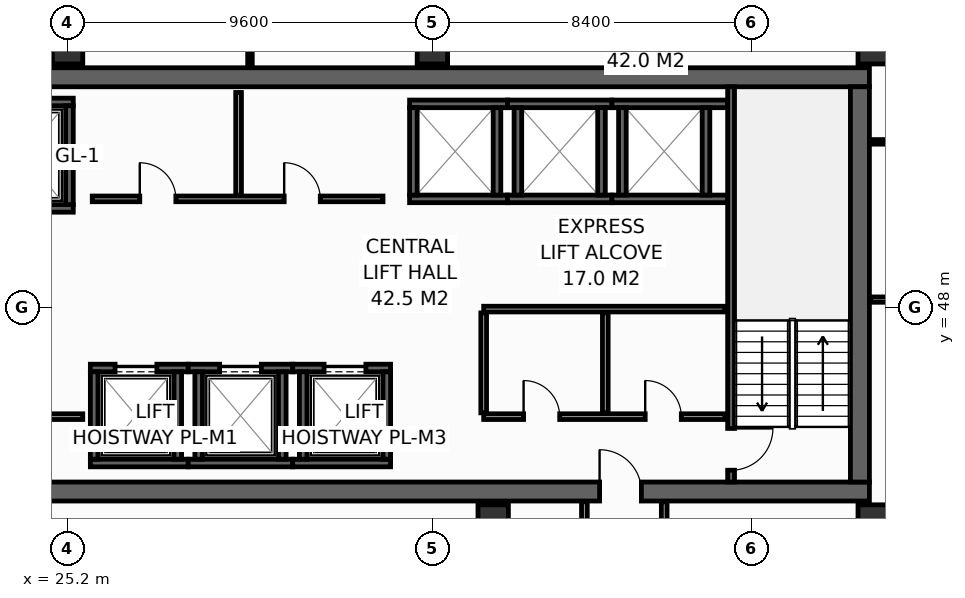
"""IFC4 building model, lengths in metres.
Left out: names, types, materials, properties, quantities, classifications, styles, units other than length and angle.
Written with IfcOpenShell. Run it as: python <this file> out.ifc"""

import sys

from ifc_helpers import new_model, si_unit, direction, frame, frame_2d, origin, origin_2d, place, context, subcontext, project, spatial, rectangle, hollow_rectangle, extrude, element, fill, save


model = new_model("IFC4")
c1 = context("Model", 3, precision=1e-05, world=origin(), true_north=direction((0.0, 1.0)))
c2 = subcontext(c1, "Body", "Model", "MODEL_VIEW")
j1 = project(units=[si_unit("LENGTHUNIT", "METRE"), si_unit("PLANEANGLEUNIT", "RADIAN")], contexts=[c1])
p1 = place(None, origin())
s1 = spatial("IfcSite", under=j1, at=p1, CompositionType="ELEMENT")
p2 = place(p1, origin())
s2 = spatial("IfcBuilding", under=s1, at=p2, CompositionType="ELEMENT")
p3 = place(p2, frame((0.0, 0.0, 194.2)))
s3 = spatial("IfcBuildingStorey", under=s2, at=p3, CompositionType="ELEMENT", Elevation=194.2)
p4 = place(p3, frame((13.6, 43.15, 0.0), z_axis=(0.0, 0.0, 1.0), x_axis=(1.0, 0.0, 0.0)))
e1 = element("IfcWall", 1, at=p4, inside=s3, PredefinedType="SHEAR", context=c2, shape_type="SweptSolid", body=[
    extrude(rectangle(XDim=32.7, YDim=0.5, at=frame_2d((16.35, 0.0))), origin(), (0.0, 0.0, 1.0), 3.55),
])
p5 = place(p4, frame((5.4, 0.0, 0.0)))
e2 = element("IfcOpeningElement", 2, at=p5, cuts=e1, PredefinedType="OPENING", context=c2, shape_type="SweptSolid", body=[
    extrude(rectangle(XDim=1.1, YDim=2.15, at=frame_2d((0.55, 1.075))), frame((0.0, 0.26, 0.0), z_axis=(0.0, -1.0, 0.0), x_axis=(1.0, 0.0, 0.0)), (0.0, 0.0, 1.0), 0.52),
])
p6 = place(p4, frame((25.6, 0.0, 0.0)))
e3 = element("IfcOpeningElement", 3, at=p6, cuts=e1, PredefinedType="OPENING", context=c2, shape_type="SweptSolid", body=[
    extrude(rectangle(XDim=1.1, YDim=2.15, at=frame_2d((0.55, 1.075))), frame((0.0, 0.26, 0.0), z_axis=(0.0, -1.0, 0.0), x_axis=(1.0, 0.0, 0.0)), (0.0, 0.0, 1.0), 0.52),
])
p7 = place(p3, frame((13.6, 54.05, 0.0), z_axis=(0.0, 0.0, 1.0), x_axis=(1.0, 0.0, 0.0)))
e4 = element("IfcWall", 4, at=p7, inside=s3, PredefinedType="SHEAR", context=c2, shape_type="SweptSolid", body=[
    extrude(rectangle(XDim=32.7, YDim=0.5, at=frame_2d((16.35, 0.0))), origin(), (0.0, 0.0, 1.0), 3.55),
])
p8 = place(p3, frame((46.05, 43.4, 0.0), z_axis=(0.0, 0.0, 1.0), x_axis=(0.0, 1.0, 0.0)))
e5 = element("IfcWall", 5, at=p8, inside=s3, PredefinedType="SHEAR", context=c2, shape_type="SweptSolid", body=[
    extrude(rectangle(XDim=10.4, YDim=0.5, at=frame_2d((5.2, 0.0))), origin(), (0.0, 0.0, 1.0), 3.55),
])
for number, where, z_axis, x_axis in (
    (6, (25.2, 54.8, 0.0), (0.0, 0.0, 1.0), (1.0, 0.0, 0.0)),
    (7, (34.8, 54.8, 0.0), (0.0, 0.0, 1.0), (1.0, 0.0, 0.0)),
    (8, (46.4, 54.8, 0.0), (0.0, 0.0, 1.0), (1.0, 0.0, 0.0)),
    (9, (36.4, 42.4, 0.0), (0.0, 0.0, 1.0), (1.0, 0.0, 0.0)),
    (10, (46.4, 42.4, 0.0), (0.0, 0.0, 1.0), (1.0, 0.0, 0.0)),
):
    element("IfcColumn", number, at=place(p3, frame(where, z_axis=z_axis, x_axis=x_axis)), inside=s3, PredefinedType="COLUMN", context=c2, shape_type="SweptSolid", body=[
        extrude(hollow_rectangle(XDim=0.8, YDim=0.8, WallThickness=0.036, at=origin_2d()), origin(), (0.0, 0.0, 1.0), 3.8),
    ])
p9 = place(p3, frame((22.5, 50.6, 0.0), z_axis=(0.0, 0.0, 1.0), x_axis=(1.0, 0.0, 0.0)))
e11 = element("IfcWall", 11, at=p9, inside=s3, PredefinedType="SHEAR", context=c2, shape_type="SweptSolid", body=[
    extrude(rectangle(XDim=2.85, YDim=0.2, at=frame_2d((1.425, 0.0))), origin(), (0.0, 0.0, 1.0), 3.55),
])
p10 = place(p9, frame((0.925, 0.0, 0.0)))
e12 = element("IfcOpeningElement", 12, at=p10, cuts=e11, PredefinedType="OPENING", context=c2, shape_type="SweptSolid", body=[
    extrude(rectangle(XDim=1.25, YDim=2.3, at=frame_2d((0.625, 1.15))), frame((0.0, 0.11, 0.0), z_axis=(0.0, -1.0, 0.0), x_axis=(1.0, 0.0, 0.0)), (0.0, 0.0, 1.0), 0.22),
])
p11 = place(p3, frame((22.5, 53.4, 0.0), z_axis=(0.0, 0.0, 1.0), x_axis=(1.0, 0.0, 0.0)))
e13 = element("IfcWall", 13, at=p11, inside=s3, PredefinedType="SHEAR", context=c2, shape_type="SweptSolid", body=[
    extrude(rectangle(XDim=2.85, YDim=0.2, at=frame_2d((1.425, 0.0))), origin(), (0.0, 0.0, 1.0), 3.55),
])
p12 = place(p3, frame((25.25, 50.7, 0.0), z_axis=(0.0, 0.0, 1.0), x_axis=(0.0, 1.0, 0.0)))
e14 = element("IfcWall", 14, at=p12, inside=s3, PredefinedType="SHEAR", context=c2, shape_type="SweptSolid", body=[
    extrude(rectangle(XDim=2.6, YDim=0.2, at=frame_2d((1.3, 0.0))), origin(), (0.0, 0.0, 1.0), 3.55),
])
p13 = place(p3, frame((25.8, 43.9, 0.0), z_axis=(0.0, 0.0, 1.0), x_axis=(1.0, 0.0, 0.0)))
e15 = element("IfcWall", 15, at=p13, inside=s3, PredefinedType="SHEAR", context=c2, shape_type="SweptSolid", body=[
    extrude(rectangle(XDim=2.575, YDim=0.2, at=frame_2d((1.288, 0.0))), origin(), (0.0, 0.0, 1.0), 3.55),
])
p14 = place(p3, frame((25.8, 46.4, 0.0), z_axis=(0.0, 0.0, 1.0), x_axis=(1.0, 0.0, 0.0)))
e16 = element("IfcWall", 16, at=p14, inside=s3, PredefinedType="SHEAR", context=c2, shape_type="SweptSolid", body=[
    extrude(rectangle(XDim=2.575, YDim=0.2, at=frame_2d((1.288, 0.0))), origin(), (0.0, 0.0, 1.0), 3.55),
])
p15 = place(p14, frame((0.65, 0.0, 0.0)))
e17 = element("IfcOpeningElement", 17, at=p15, cuts=e16, PredefinedType="OPENING", context=c2, shape_type="SweptSolid", body=[
    extrude(rectangle(XDim=1.1, YDim=2.2, at=frame_2d((0.55, 1.1))), frame((0.0, 0.11, 0.0), z_axis=(0.0, -1.0, 0.0), x_axis=(1.0, 0.0, 0.0)), (0.0, 0.0, 1.0), 0.22),
])
for number, where, z_axis, x_axis in (
    (18, (25.9, 44.0, 0.0), (0.0, 0.0, 1.0), (0.0, 1.0, 0.0)),
    (19, (28.1, 44.0, 0.0), (0.0, 0.0, 1.0), (0.0, 1.0, 0.0)),
):
    element("IfcWall", number, at=place(p3, frame(where, z_axis=z_axis, x_axis=x_axis)), inside=s3, PredefinedType="SHEAR", context=c2, shape_type="SweptSolid", body=[
        extrude(rectangle(XDim=2.3, YDim=0.2, at=frame_2d((1.15, 0.0))), origin(), (0.0, 0.0, 1.0), 3.55),
    ])
p16 = place(p3, frame((28.375, 43.9, 0.0), z_axis=(0.0, 0.0, 1.0), x_axis=(1.0, 0.0, 0.0)))
e20 = element("IfcWall", 20, at=p16, inside=s3, PredefinedType="SHEAR", context=c2, shape_type="SweptSolid", body=[
    extrude(rectangle(XDim=2.75, YDim=0.2, at=frame_2d((1.375, 0.0))), origin(), (0.0, 0.0, 1.0), 3.55),
])
p17 = place(p3, frame((28.375, 46.4, 0.0), z_axis=(0.0, 0.0, 1.0), x_axis=(1.0, 0.0, 0.0)))
e21 = element("IfcWall", 21, at=p17, inside=s3, PredefinedType="SHEAR", context=c2, shape_type="SweptSolid", body=[
    extrude(rectangle(XDim=2.75, YDim=0.2, at=frame_2d((1.375, 0.0))), origin(), (0.0, 0.0, 1.0), 3.55),
])
p18 = place(p17, frame((0.825, 0.0, 0.0)))
e22 = element("IfcOpeningElement", 22, at=p18, cuts=e21, PredefinedType="OPENING", context=c2, shape_type="SweptSolid", body=[
    extrude(rectangle(XDim=1.1, YDim=2.2, at=frame_2d((0.55, 1.1))), frame((0.0, 0.11, 0.0), z_axis=(0.0, -1.0, 0.0), x_axis=(1.0, 0.0, 0.0)), (0.0, 0.0, 1.0), 0.22),
])
for number, where, z_axis, x_axis in (
    (23, (28.65, 44.0, 0.0), (0.0, 0.0, 1.0), (0.0, 1.0, 0.0)),
    (24, (30.85, 44.0, 0.0), (0.0, 0.0, 1.0), (0.0, 1.0, 0.0)),
):
    element("IfcWall", number, at=place(p3, frame(where, z_axis=z_axis, x_axis=x_axis)), inside=s3, PredefinedType="SHEAR", context=c2, shape_type="SweptSolid", body=[
        extrude(rectangle(XDim=2.3, YDim=0.2, at=frame_2d((1.15, 0.0))), origin(), (0.0, 0.0, 1.0), 3.55),
    ])
p19 = place(p3, frame((31.125, 43.9, 0.0), z_axis=(0.0, 0.0, 1.0), x_axis=(1.0, 0.0, 0.0)))
e25 = element("IfcWall", 25, at=p19, inside=s3, PredefinedType="SHEAR", context=c2, shape_type="SweptSolid", body=[
    extrude(rectangle(XDim=2.575, YDim=0.2, at=frame_2d((1.288, 0.0))), origin(), (0.0, 0.0, 1.0), 3.55),
])
p20 = place(p3, frame((31.125, 46.4, 0.0), z_axis=(0.0, 0.0, 1.0), x_axis=(1.0, 0.0, 0.0)))
e26 = element("IfcWall", 26, at=p20, inside=s3, PredefinedType="SHEAR", context=c2, shape_type="SweptSolid", body=[
    extrude(rectangle(XDim=2.575, YDim=0.2, at=frame_2d((1.288, 0.0))), origin(), (0.0, 0.0, 1.0), 3.55),
])
p21 = place(p20, frame((0.825, 0.0, 0.0)))
e27 = element("IfcOpeningElement", 27, at=p21, cuts=e26, PredefinedType="OPENING", context=c2, shape_type="SweptSolid", body=[
    extrude(rectangle(XDim=1.1, YDim=2.2, at=frame_2d((0.55, 1.1))), frame((0.0, 0.11, 0.0), z_axis=(0.0, -1.0, 0.0), x_axis=(1.0, 0.0, 0.0)), (0.0, 0.0, 1.0), 0.22),
])
for number, where, z_axis, x_axis in (
    (28, (31.4, 44.0, 0.0), (0.0, 0.0, 1.0), (0.0, 1.0, 0.0)),
    (29, (33.6, 44.0, 0.0), (0.0, 0.0, 1.0), (0.0, 1.0, 0.0)),
):
    element("IfcWall", number, at=place(p3, frame(where, z_axis=z_axis, x_axis=x_axis)), inside=s3, PredefinedType="SHEAR", context=c2, shape_type="SweptSolid", body=[
        extrude(rectangle(XDim=2.3, YDim=0.2, at=frame_2d((1.15, 0.0))), origin(), (0.0, 0.0, 1.0), 3.55),
    ])
for number, where, z_axis, x_axis in (
    (30, (34.2, 50.85, 0.0), (0.0, 0.0, 1.0), (1.0, 0.0, 0.0)),
    (31, (34.2, 53.35, 0.0), (0.0, 0.0, 1.0), (1.0, 0.0, 0.0)),
):
    element("IfcWall", number, at=place(p3, frame(where, z_axis=z_axis, x_axis=x_axis)), inside=s3, PredefinedType="SHEAR", context=c2, shape_type="SweptSolid", body=[
        extrude(rectangle(XDim=2.575, YDim=0.2, at=frame_2d((1.288, 0.0))), origin(), (0.0, 0.0, 1.0), 3.55),
    ])
for number, where, z_axis, x_axis in (
    (32, (34.3, 50.95, 0.0), (0.0, 0.0, 1.0), (0.0, 1.0, 0.0)),
    (33, (36.5, 50.95, 0.0), (0.0, 0.0, 1.0), (0.0, 1.0, 0.0)),
):
    element("IfcWall", number, at=place(p3, frame(where, z_axis=z_axis, x_axis=x_axis)), inside=s3, PredefinedType="SHEAR", context=c2, shape_type="SweptSolid", body=[
        extrude(rectangle(XDim=2.3, YDim=0.2, at=frame_2d((1.15, 0.0))), origin(), (0.0, 0.0, 1.0), 3.55),
    ])
for number, where, z_axis, x_axis in (
    (34, (36.775, 50.85, 0.0), (0.0, 0.0, 1.0), (1.0, 0.0, 0.0)),
    (35, (36.775, 53.35, 0.0), (0.0, 0.0, 1.0), (1.0, 0.0, 0.0)),
):
    element("IfcWall", number, at=place(p3, frame(where, z_axis=z_axis, x_axis=x_axis)), inside=s3, PredefinedType="SHEAR", context=c2, shape_type="SweptSolid", body=[
        extrude(rectangle(XDim=2.75, YDim=0.2, at=frame_2d((1.375, 0.0))), origin(), (0.0, 0.0, 1.0), 3.55),
    ])
for number, where, z_axis, x_axis in (
    (36, (37.05, 50.95, 0.0), (0.0, 0.0, 1.0), (0.0, 1.0, 0.0)),
    (37, (39.25, 50.95, 0.0), (0.0, 0.0, 1.0), (0.0, 1.0, 0.0)),
):
    element("IfcWall", number, at=place(p3, frame(where, z_axis=z_axis, x_axis=x_axis)), inside=s3, PredefinedType="SHEAR", context=c2, shape_type="SweptSolid", body=[
        extrude(rectangle(XDim=2.3, YDim=0.2, at=frame_2d((1.15, 0.0))), origin(), (0.0, 0.0, 1.0), 3.55),
    ])
for number, where, z_axis, x_axis in (
    (38, (39.525, 50.85, 0.0), (0.0, 0.0, 1.0), (1.0, 0.0, 0.0)),
    (39, (39.525, 53.35, 0.0), (0.0, 0.0, 1.0), (1.0, 0.0, 0.0)),
):
    element("IfcWall", number, at=place(p3, frame(where, z_axis=z_axis, x_axis=x_axis)), inside=s3, PredefinedType="SHEAR", context=c2, shape_type="SweptSolid", body=[
        extrude(rectangle(XDim=3.045, YDim=0.2, at=frame_2d((1.522, 0.0))), origin(), (0.0, 0.0, 1.0), 3.55),
    ])
for number, where, z_axis, x_axis in (
    (40, (39.8, 50.95, 0.0), (0.0, 0.0, 1.0), (0.0, 1.0, 0.0)),
    (41, (42.0, 50.95, 0.0), (0.0, 0.0, 1.0), (0.0, 1.0, 0.0)),
):
    element("IfcWall", number, at=place(p3, frame(where, z_axis=z_axis, x_axis=x_axis)), inside=s3, PredefinedType="SHEAR", context=c2, shape_type="SweptSolid", body=[
        extrude(rectangle(XDim=2.3, YDim=0.2, at=frame_2d((1.15, 0.0))), origin(), (0.0, 0.0, 1.0), 3.55),
    ])
p22 = place(p3, frame((42.66, 53.8, 0.0), z_axis=(0.0, 0.0, 1.0), x_axis=(0.0, -1.0, 0.0)))
e42 = element("IfcWall", 42, at=p22, inside=s3, PredefinedType="SHEAR", context=c2, shape_type="SweptSolid", body=[
    extrude(rectangle(XDim=10.4, YDim=0.18, at=frame_2d((5.2, 0.0))), origin(), (0.0, 0.0, 1.0), 3.55),
])
p23 = place(p22, frame((8.99, 0.0, 0.0)))
e43 = element("IfcOpeningElement", 43, at=p23, cuts=e42, PredefinedType="OPENING", context=c2, shape_type="SweptSolid", body=[
    extrude(rectangle(XDim=1.1, YDim=2.15, at=frame_2d((0.55, 1.075))), frame((0.0, 0.1, 0.0), z_axis=(0.0, -1.0, 0.0), x_axis=(1.0, 0.0, 0.0)), (0.0, 0.0, 1.0), 0.2),
])
p24 = place(p3, frame((22.68, 45.12, 0.0), z_axis=(0.0, 0.0, 1.0), x_axis=(1.0, 0.0, 0.0)))
e44 = element("IfcWall", 44, at=p24, inside=s3, PredefinedType="PARTITIONING", context=c2, shape_type="SweptSolid", body=[
    extrude(rectangle(XDim=2.92, YDim=0.15, at=frame_2d((1.46, 0.0))), origin(), (0.0, 0.0, 1.0), 3.55),
])
p25 = place(p24, frame((0.85, 0.0, 0.0)))
e45 = element("IfcOpeningElement", 45, at=p25, cuts=e44, PredefinedType="OPENING", context=c2, shape_type="SweptSolid", body=[
    extrude(rectangle(XDim=1.1, YDim=2.15, at=frame_2d((0.55, 1.075))), frame((0.0, 0.085, 0.0), z_axis=(0.0, -1.0, 0.0), x_axis=(1.0, 0.0, 0.0)), (0.0, 0.0, 1.0), 0.17),
])
p26 = place(p3, frame((36.15, 45.12, 0.0), z_axis=(0.0, 0.0, 1.0), x_axis=(1.0, 0.0, 0.0)))
e46 = element("IfcWall", 46, at=p26, inside=s3, PredefinedType="PARTITIONING", context=c2, shape_type="SweptSolid", body=[
    extrude(rectangle(XDim=6.35, YDim=0.15, at=frame_2d((3.175, 0.0))), origin(), (0.0, 0.0, 1.0), 3.55),
])
p27 = place(p26, frame((1.05, 0.0, 0.0)))
e47 = element("IfcOpeningElement", 47, at=p27, cuts=e46, PredefinedType="OPENING", context=c2, shape_type="SweptSolid", body=[
    extrude(rectangle(XDim=0.95, YDim=2.15, at=frame_2d((0.475, 1.075))), frame((0.0, 0.085, 0.0), z_axis=(0.0, -1.0, 0.0), x_axis=(1.0, 0.0, 0.0)), (0.0, 0.0, 1.0), 0.17),
])
p28 = place(p26, frame((4.25, 0.0, 0.0)))
e48 = element("IfcOpeningElement", 48, at=p28, cuts=e46, PredefinedType="OPENING", context=c2, shape_type="SweptSolid", body=[
    extrude(rectangle(XDim=0.95, YDim=2.15, at=frame_2d((0.475, 1.075))), frame((0.0, 0.085, 0.0), z_axis=(0.0, -1.0, 0.0), x_axis=(1.0, 0.0, 0.0)), (0.0, 0.0, 1.0), 0.17),
])
p29 = place(p3, frame((36.15, 47.95, 0.0), z_axis=(0.0, 0.0, 1.0), x_axis=(1.0, 0.0, 0.0)))
e49 = element("IfcWall", 49, at=p29, inside=s3, PredefinedType="PARTITIONING", context=c2, shape_type="SweptSolid", body=[
    extrude(rectangle(XDim=6.35, YDim=0.15, at=frame_2d((3.175, 0.0))), origin(), (0.0, 0.0, 1.0), 3.55),
])
for number, where, z_axis, x_axis in (
    (50, (36.15, 45.22, 0.0), (0.0, 0.0, 1.0), (0.0, 1.0, 0.0)),
    (51, (39.35, 45.22, 0.0), (0.0, 0.0, 1.0), (0.0, 1.0, 0.0)),
):
    element("IfcWall", number, at=place(p3, frame(where, z_axis=z_axis, x_axis=x_axis)), inside=s3, PredefinedType="PARTITIONING", context=c2, shape_type="SweptSolid", body=[
        extrude(rectangle(XDim=2.63, YDim=0.15, at=frame_2d((1.315, 0.0))), origin(), (0.0, 0.0, 1.0), 3.55),
    ])
p30 = place(p3, frame((25.85, 50.85, 0.0), z_axis=(0.0, 0.0, 1.0), x_axis=(1.0, 0.0, 0.0)))
e52 = element("IfcWall", 52, at=p30, inside=s3, PredefinedType="PARTITIONING", context=c2, shape_type="SweptSolid", body=[
    extrude(rectangle(XDim=7.65, YDim=0.15, at=frame_2d((3.825, 0.0))), origin(), (0.0, 0.0, 1.0), 3.55),
])
p31 = place(p30, frame((1.25, 0.0, 0.0)))
e53 = element("IfcOpeningElement", 53, at=p31, cuts=e52, PredefinedType="OPENING", context=c2, shape_type="SweptSolid", body=[
    extrude(rectangle(XDim=0.95, YDim=2.15, at=frame_2d((0.475, 1.075))), frame((0.0, 0.085, 0.0), z_axis=(0.0, -1.0, 0.0), x_axis=(1.0, 0.0, 0.0)), (0.0, 0.0, 1.0), 0.17),
])
p32 = place(p30, frame((5.05, 0.0, 0.0)))
e54 = element("IfcOpeningElement", 54, at=p32, cuts=e52, PredefinedType="OPENING", context=c2, shape_type="SweptSolid", body=[
    extrude(rectangle(XDim=0.95, YDim=2.15, at=frame_2d((0.475, 1.075))), frame((0.0, 0.085, 0.0), z_axis=(0.0, -1.0, 0.0), x_axis=(1.0, 0.0, 0.0)), (0.0, 0.0, 1.0), 0.17),
])
p33 = place(p3, frame((29.7, 50.95, 0.0), z_axis=(0.0, 0.0, 1.0), x_axis=(0.0, 1.0, 0.0)))
e55 = element("IfcWall", 55, at=p33, inside=s3, PredefinedType="PARTITIONING", context=c2, shape_type="SweptSolid", body=[
    extrude(rectangle(XDim=2.7, YDim=0.15, at=frame_2d((1.35, 0.0))), origin(), (0.0, 0.0, 1.0), 3.55),
])
p34 = place(p3, frame((46.15, 41.24, 0.0), z_axis=(0.0, 0.0, 1.0), x_axis=(0.0, 1.0, 0.0)))
e56 = element("IfcWall", 56, at=p34, inside=s3, PredefinedType="PARTITIONING", context=c2, shape_type="SweptSolid", body=[
    extrude(rectangle(XDim=1.64, YDim=0.14, at=frame_2d((0.82, 0.0))), origin(), (0.0, 0.0, 1.0), 3.55),
])
p35 = place(p3, frame((46.32, 48.2, 0.0), z_axis=(0.0, 0.0, 1.0), x_axis=(1.0, 0.0, 0.0)))
e57 = element("IfcWall", 57, at=p35, inside=s3, PredefinedType="PARTITIONING", context=c2, shape_type="SweptSolid", body=[
    extrude(rectangle(XDim=3.88, YDim=0.14, at=frame_2d((1.94, 0.0))), origin(), (0.0, 0.0, 1.0), 3.55),
])
p36 = place(p3, frame((46.32, 52.35, 0.0), z_axis=(0.0, 0.0, 1.0), x_axis=(1.0, 0.0, 0.0)))
e58 = element("IfcWall", 58, at=p36, inside=s3, PredefinedType="PARTITIONING", context=c2, shape_type="SweptSolid", body=[
    extrude(rectangle(XDim=3.88, YDim=0.12, at=frame_2d((1.94, 0.0))), origin(), (0.0, 0.0, 1.0), 3.55),
])
p37 = place(p3, frame((30.0, 54.32, 0.0), z_axis=(0.0, 0.0, 1.0), x_axis=(0.0, 1.0, 0.0)))
e59 = element("IfcWall", 59, at=p37, inside=s3, PredefinedType="PARTITIONING", context=c2, shape_type="SweptSolid", body=[
    extrude(rectangle(XDim=1.675, YDim=0.12, at=frame_2d((0.837, 0.0))), origin(), (0.0, 0.0, 1.0), 2.935),
])
for number, where, z_axis, x_axis in (
    (60, (38.8, 41.15, 0.0), (0.0, 0.0, 1.0), (0.0, 1.0, 0.0)),
    (61, (40.9, 41.15, 0.0), (0.0, 0.0, 1.0), (0.0, 1.0, 0.0)),
):
    element("IfcWall", number, at=place(p3, frame(where, z_axis=z_axis, x_axis=x_axis)), inside=s3, PredefinedType="PARTITIONING", context=c2, shape_type="SweptSolid", body=[
        extrude(rectangle(XDim=1.73, YDim=0.15, at=frame_2d((0.865, 0.0))), origin(), (0.0, 0.0, 1.0), 3.55),
    ])
p38 = place(p15, origin())
e62 = element("IfcDoor", 62, at=p38, inside=s3, OperationType="SLIDING_TO_LEFT", PredefinedType="DOOR", context=c2, shape_type="SweptSolid", body=[
    extrude(rectangle(XDim=1.1, YDim=2.2, at=frame_2d((0.55, 1.1))), frame((0.0, 0.025, 0.0), z_axis=(0.0, -1.0, 0.0), x_axis=(1.0, 0.0, 0.0)), (0.0, 0.0, 1.0), 0.05),
])
fill(e17, e62)
p39 = place(p18, origin())
e63 = element("IfcDoor", 63, at=p39, inside=s3, OperationType="SLIDING_TO_LEFT", PredefinedType="DOOR", context=c2, shape_type="SweptSolid", body=[
    extrude(rectangle(XDim=1.1, YDim=2.2, at=frame_2d((0.55, 1.1))), frame((0.0, 0.025, 0.0), z_axis=(0.0, -1.0, 0.0), x_axis=(1.0, 0.0, 0.0)), (0.0, 0.0, 1.0), 0.05),
])
fill(e22, e63)
p40 = place(p21, origin())
e64 = element("IfcDoor", 64, at=p40, inside=s3, OperationType="SLIDING_TO_LEFT", PredefinedType="DOOR", context=c2, shape_type="SweptSolid", body=[
    extrude(rectangle(XDim=1.1, YDim=2.2, at=frame_2d((0.55, 1.1))), frame((0.0, 0.025, 0.0), z_axis=(0.0, -1.0, 0.0), x_axis=(1.0, 0.0, 0.0)), (0.0, 0.0, 1.0), 0.05),
])
fill(e27, e64)
p41 = place(p23, origin())
e65 = element("IfcDoor", 65, at=p41, inside=s3, OperationType="SINGLE_SWING_LEFT", PredefinedType="DOOR", context=c2, shape_type="SweptSolid", body=[
    extrude(rectangle(XDim=1.1, YDim=2.15, at=frame_2d((0.55, 1.075))), frame((0.0, 0.025, 0.0), z_axis=(0.0, -1.0, 0.0), x_axis=(1.0, 0.0, 0.0)), (0.0, 0.0, 1.0), 0.05),
])
fill(e43, e65)
p42 = place(p6, origin())
e66 = element("IfcDoor", 66, at=p42, inside=s3, OperationType="SINGLE_SWING_LEFT", PredefinedType="DOOR", context=c2, shape_type="SweptSolid", body=[
    extrude(rectangle(XDim=1.1, YDim=2.15, at=frame_2d((0.55, 1.075))), frame((0.0, 0.025, 0.0), z_axis=(0.0, -1.0, 0.0), x_axis=(1.0, 0.0, 0.0)), (0.0, 0.0, 1.0), 0.05),
])
fill(e3, e66)
p43 = place(p27, origin())
e67 = element("IfcDoor", 67, at=p43, inside=s3, OperationType="SINGLE_SWING_LEFT", PredefinedType="DOOR", context=c2, shape_type="SweptSolid", body=[
    extrude(rectangle(XDim=0.95, YDim=2.15, at=frame_2d((0.475, 1.075))), frame((0.0, 0.025, 0.0), z_axis=(0.0, -1.0, 0.0), x_axis=(1.0, 0.0, 0.0)), (0.0, 0.0, 1.0), 0.05),
])
fill(e47, e67)
p44 = place(p28, origin())
e68 = element("IfcDoor", 68, at=p44, inside=s3, OperationType="SINGLE_SWING_LEFT", PredefinedType="DOOR", context=c2, shape_type="SweptSolid", body=[
    extrude(rectangle(XDim=0.95, YDim=2.15, at=frame_2d((0.475, 1.075))), frame((0.0, 0.025, 0.0), z_axis=(0.0, -1.0, 0.0), x_axis=(1.0, 0.0, 0.0)), (0.0, 0.0, 1.0), 0.05),
])
fill(e48, e68)
p45 = place(p31, origin())
e69 = element("IfcDoor", 69, at=p45, inside=s3, OperationType="SINGLE_SWING_LEFT", PredefinedType="DOOR", context=c2, shape_type="SweptSolid", body=[
    extrude(rectangle(XDim=0.95, YDim=2.15, at=frame_2d((0.475, 1.075))), frame((0.0, 0.025, 0.0), z_axis=(0.0, -1.0, 0.0), x_axis=(1.0, 0.0, 0.0)), (0.0, 0.0, 1.0), 0.05),
])
fill(e53, e69)
p46 = place(p32, origin())
e70 = element("IfcDoor", 70, at=p46, inside=s3, OperationType="SINGLE_SWING_LEFT", PredefinedType="DOOR", context=c2, shape_type="SweptSolid", body=[
    extrude(rectangle(XDim=0.95, YDim=2.15, at=frame_2d((0.475, 1.075))), frame((0.0, 0.025, 0.0), z_axis=(0.0, -1.0, 0.0), x_axis=(1.0, 0.0, 0.0)), (0.0, 0.0, 1.0), 0.05),
])
fill(e54, e70)
save(model, sys.argv[1])
